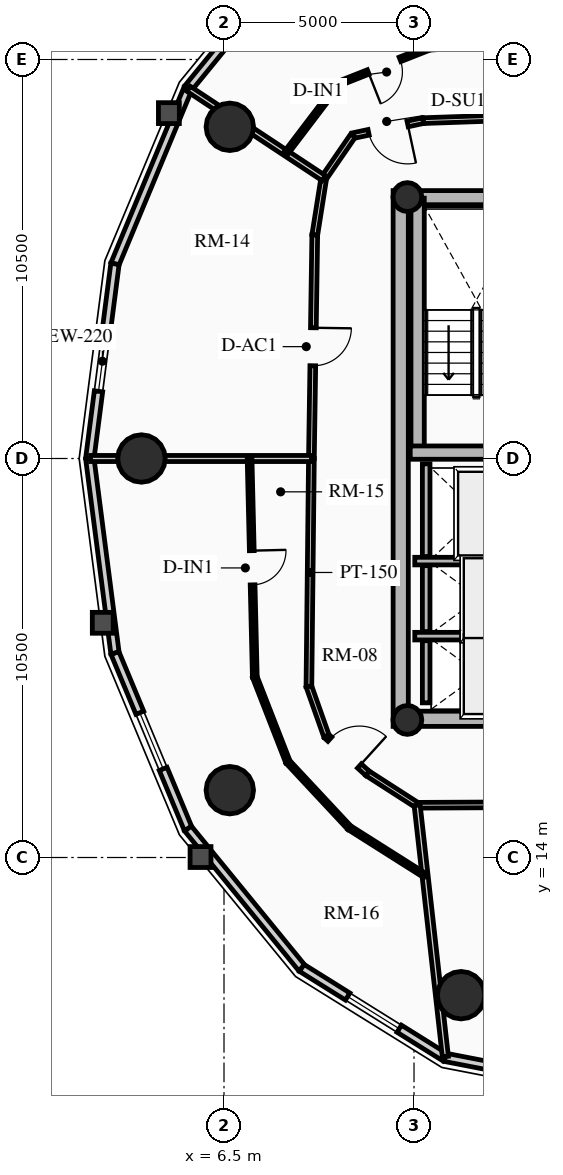
"""IFC4 building model, lengths in metres.
Left out: names, types, materials, properties, quantities, classifications, styles, units other than length and angle.
Written with IfcOpenShell. Run it as: python <this file> out.ifc"""

import sys

from ifc_helpers import new_model, si_unit, direction, frame, frame_2d, origin, origin_2d, place, context, subcontext, project, spatial, rectangle, circle, hollow_circle, extrude, source, transform, mapped, element, fill, save


model = new_model("IFC4")
c1 = context("Model", 3, precision=1e-05, world=origin(), true_north=direction((0.0, 1.0)))
c2 = subcontext(c1, "Body", "Model", "MODEL_VIEW")
j1 = project(units=[si_unit("LENGTHUNIT", "METRE"), si_unit("PLANEANGLEUNIT", "RADIAN")], contexts=[c1])
p1 = place(None, origin())
s1 = spatial("IfcSite", under=j1, at=p1, CompositionType="ELEMENT")
p2 = place(p1, origin())
s2 = spatial("IfcBuilding", under=s1, at=p2, CompositionType="ELEMENT")
p3 = place(p2, frame((0.0, 0.0, 174.88)))
s3 = spatial("IfcBuildingStorey", under=s2, at=p3, CompositionType="ELEMENT", Elevation=174.88)
p4 = place(p3, frame((11.15, 17.45, 0.0), z_axis=(0.0, 0.0, 1.0), x_axis=(0.0, 1.0, 0.0)))
e1 = element("IfcWall", 1, at=p4, inside=s3, PredefinedType="SHEAR", context=c2, shape_type="SweptSolid", body=[
    extrude(rectangle(XDim=14.1, YDim=0.4, at=frame_2d((7.05, 0.0))), origin(), (0.0, 0.0, 1.0), 2.91),
])
p5 = place(p3, frame((11.15, 17.65, 0.0), z_axis=(0.0, 0.0, 1.0), x_axis=(1.0, 0.0, 0.0)))
e2 = element("IfcWall", 2, at=p5, inside=s3, PredefinedType="SHEAR", context=c2, shape_type="SweptSolid", body=[
    extrude(rectangle(XDim=10.7, YDim=0.4, at=frame_2d((5.35, 0.0))), origin(), (0.0, 0.0, 1.0), 2.91),
])
m1 = source(origin(), c2, "Body", "SweptSolid", [
    extrude(rectangle(XDim=1.5, YDim=2.02, at=frame_2d((0.75, 1.01))), frame((0.0, 0.21, 0.0), z_axis=(0.0, -1.0, 0.0), x_axis=(1.0, 0.0, 0.0)), (0.0, 0.0, 1.0), 0.42),
])
p6 = place(p5, frame((5.45, 0.0, 0.0)))
e3 = element("IfcOpeningElement", 3, at=p6, cuts=e2, PredefinedType="OPENING", context=c2, shape_type="MappedRepresentation", body=[
    mapped(m1, transform((0.0, 0.0, 0.0), x_axis=(1.0, 0.0, 0.0), y_axis=(0.0, 1.0, 0.0), z_axis=(0.0, 0.0, 1.0), scale=1.0)),
])
p7 = place(p3, frame((11.15, 31.35, 0.0), z_axis=(0.0, 0.0, 1.0), x_axis=(1.0, 0.0, 0.0)))
e4 = element("IfcWall", 4, at=p7, inside=s3, PredefinedType="SHEAR", context=c2, shape_type="SweptSolid", body=[
    extrude(rectangle(XDim=10.7, YDim=0.4, at=frame_2d((5.35, 0.0))), origin(), (0.0, 0.0, 1.0), 2.91),
])
p8 = place(p7, frame((4.6, 0.0, 0.0)))
e5 = element("IfcOpeningElement", 5, at=p8, cuts=e4, PredefinedType="OPENING", context=c2, shape_type="MappedRepresentation", body=[
    mapped(m1, transform((0.0, 0.0, 0.0), x_axis=(1.0, 0.0, 0.0), y_axis=(0.0, 1.0, 0.0), z_axis=(0.0, 0.0, 1.0), scale=1.0)),
])
p9 = place(p3, frame((11.595, 24.655, 0.0), z_axis=(0.0, 0.0, 1.0), x_axis=(0.0, 1.0, 0.0)))
e6 = element("IfcWall", 6, at=p9, inside=s3, PredefinedType="SHEAR", context=c2, shape_type="SweptSolid", body=[
    extrude(rectangle(XDim=6.695, YDim=0.35, at=frame_2d((3.348, 0.0))), origin(), (0.0, 0.0, 1.0), 2.91),
])
p10 = place(p3, frame((11.4, 24.655, 0.0), z_axis=(0.0, 0.0, 1.0), x_axis=(1.0, 0.0, 0.0)))
e7 = element("IfcWall", 7, at=p10, inside=s3, PredefinedType="SHEAR", context=c2, shape_type="SweptSolid", body=[
    extrude(rectangle(XDim=3.285, YDim=0.35, at=frame_2d((1.643, 0.0))), origin(), (0.0, 0.0, 1.0), 2.91),
])
for number, where, z_axis, x_axis in (
    (8, (11.325, 17.62, 0.0), (0.0, 0.0, 1.0), (1.0, 0.0, 0.0)),
    (9, (11.325, 31.38, 0.0), (0.0, 0.0, 1.0), (1.0, 0.0, 0.0)),
):
    element("IfcColumn", number, at=place(p3, frame(where, z_axis=z_axis, x_axis=x_axis)), inside=s3, PredefinedType="COLUMN", context=c2, shape_type="SweptSolid", body=[
        extrude(hollow_circle(Radius=0.38, WallThickness=0.032, at=origin_2d()), origin(), (0.0, 0.0, 1.0), 2.91),
    ])
for number, where, z_axis, x_axis in (
    (10, (6.653, 33.229, 0.0), (0.0, 0.0, 1.0), (1.0, 0.0, 0.0)),
    (11, (4.328, 24.5, 0.0), (0.0, 0.0, 1.0), (1.0, 0.0, 0.0)),
    (12, (6.653, 15.771, 0.0), (0.0, 0.0, 1.0), (1.0, 0.0, 0.0)),
    (13, (12.739, 10.377, 0.0), (0.0, 0.0, 1.0), (1.0, 0.0, 0.0)),
):
    element("IfcColumn", number, at=place(p3, frame(where, z_axis=z_axis, x_axis=x_axis)), inside=s3, PredefinedType="USERDEFINED", context=c2, shape_type="SweptSolid", body=[
        extrude(circle(Radius=0.625, at=origin_2d()), origin(), (0.0, 0.0, 1.0), 2.91),
    ])
p11 = place(p3, frame((5.553, 34.24, 0.0), z_axis=(0.0, 0.0, 1.0), x_axis=(0.632470615287, 0.774584353572, 0.0)))
e14 = element("IfcWall", 14, at=p11, inside=s3, PredefinedType="SOLIDWALL", context=c2, shape_type="SweptSolid", body=[
    extrude(rectangle(XDim=4.733, YDim=0.22, at=frame_2d((2.366, 0.0))), origin(), (0.0, 0.0, 1.0), 2.245),
])
m2 = source(origin(), c2, "Body", "SweptSolid", [
    extrude(rectangle(XDim=1.6, YDim=1.3, at=frame_2d((0.8, 0.65))), frame((0.0, 0.12, 0.0), z_axis=(0.0, -1.0, 0.0), x_axis=(1.0, 0.0, 0.0)), (0.0, 0.0, 1.0), 0.24),
])
p12 = place(p11, frame((1.566, 0.0, 0.65)))
e15 = element("IfcOpeningElement", 15, at=p12, cuts=e14, PredefinedType="OPENING", context=c2, shape_type="MappedRepresentation", body=[
    mapped(m2, transform((0.0, 0.0, 0.0), x_axis=(1.0, 0.0, 0.0), y_axis=(0.0, 1.0, 0.0), z_axis=(0.0, 0.0, 1.0), scale=1.0)),
])
p13 = place(p3, frame((3.631, 29.62, 0.0), z_axis=(0.0, 0.0, 1.0), x_axis=(0.384144094086, 0.923273152961, 0.0)))
e16 = element("IfcWall", 16, at=p13, inside=s3, PredefinedType="SOLIDWALL", context=c2, shape_type="SweptSolid", body=[
    extrude(rectangle(XDim=5.003, YDim=0.22, at=frame_2d((2.501, 0.0))), origin(), (0.0, 0.0, 1.0), 2.245),
])
p14 = place(p3, frame((2.969, 24.5, 0.0), z_axis=(0.0, 0.0, 1.0), x_axis=(0.128287912609, 0.991736966881, 0.0)))
e17 = element("IfcWall", 17, at=p14, inside=s3, PredefinedType="SOLIDWALL", context=c2, shape_type="SweptSolid", body=[
    extrude(rectangle(XDim=5.163, YDim=0.22, at=frame_2d((2.582, 0.0))), origin(), (0.0, 0.0, 1.0), 2.245),
])
p15 = place(p14, frame((1.782, 0.0, 0.65)))
e18 = element("IfcOpeningElement", 18, at=p15, cuts=e17, PredefinedType="OPENING", context=c2, shape_type="MappedRepresentation", body=[
    mapped(m2, transform((0.0, 0.0, 0.0), x_axis=(1.0, 0.0, 0.0), y_axis=(0.0, 1.0, 0.0), z_axis=(0.0, 0.0, 1.0), scale=1.0)),
])
p16 = place(p3, frame((3.631, 19.38, 0.0), z_axis=(0.0, 0.0, 1.0), x_axis=(-0.128287912609, 0.991736966881, 0.0)))
e19 = element("IfcWall", 19, at=p16, inside=s3, PredefinedType="SOLIDWALL", context=c2, shape_type="SweptSolid", body=[
    extrude(rectangle(XDim=5.163, YDim=0.22, at=frame_2d((2.582, 0.0))), origin(), (0.0, 0.0, 1.0), 2.245),
])
p17 = place(p3, frame((5.553, 14.76, 0.0), z_axis=(0.0, 0.0, 1.0), x_axis=(-0.384144094086, 0.923273152961, 0.0)))
e20 = element("IfcWall", 20, at=p17, inside=s3, PredefinedType="SOLIDWALL", context=c2, shape_type="SweptSolid", body=[
    extrude(rectangle(XDim=5.003, YDim=0.22, at=frame_2d((2.501, 0.0))), origin(), (0.0, 0.0, 1.0), 2.245),
])
p18 = place(p17, frame((1.702, 0.0, 0.65)))
e21 = element("IfcOpeningElement", 21, at=p18, cuts=e20, PredefinedType="OPENING", context=c2, shape_type="MappedRepresentation", body=[
    mapped(m2, transform((0.0, 0.0, 0.0), x_axis=(1.0, 0.0, 0.0), y_axis=(0.0, 1.0, 0.0), z_axis=(0.0, 0.0, 1.0), scale=1.0)),
])
p19 = place(p3, frame((8.547, 11.094, 0.0), z_axis=(0.0, 0.0, 1.0), x_axis=(-0.632470615287, 0.774584353572, 0.0)))
e22 = element("IfcWall", 22, at=p19, inside=s3, PredefinedType="SOLIDWALL", context=c2, shape_type="SweptSolid", body=[
    extrude(rectangle(XDim=4.733, YDim=0.22, at=frame_2d((2.366, 0.0))), origin(), (0.0, 0.0, 1.0), 2.245),
])
p20 = place(p3, frame((12.319, 8.741, 0.0), z_axis=(0.0, 0.0, 1.0), x_axis=(-0.848399108042, 0.529357113368, 0.0)))
e23 = element("IfcWall", 23, at=p20, inside=s3, PredefinedType="SOLIDWALL", context=c2, shape_type="SweptSolid", body=[
    extrude(rectangle(XDim=4.446, YDim=0.22, at=frame_2d((2.223, 0.0))), origin(), (0.0, 0.0, 1.0), 2.245),
])
p21 = place(p20, frame((1.423, 0.0, 0.65)))
e24 = element("IfcOpeningElement", 24, at=p21, cuts=e23, PredefinedType="OPENING", context=c2, shape_type="MappedRepresentation", body=[
    mapped(m2, transform((0.0, 0.0, 0.0), x_axis=(1.0, 0.0, 0.0), y_axis=(0.0, 1.0, 0.0), z_axis=(0.0, 0.0, 1.0), scale=1.0)),
])
p22 = place(p3, frame((16.5, 7.93, 0.0), z_axis=(0.0, 0.0, 1.0), x_axis=(-0.981703883443, 0.190413983815, 0.0)))
e25 = element("IfcWall", 25, at=p22, inside=s3, PredefinedType="SOLIDWALL", context=c2, shape_type="SweptSolid", body=[
    extrude(rectangle(XDim=4.259, YDim=0.22, at=frame_2d((2.13, 0.0))), origin(), (0.0, 0.0, 1.0), 2.245),
])
p23 = place(p22, frame((1.33, 0.0, 0.65)))
e26 = element("IfcOpeningElement", 26, at=p23, cuts=e25, PredefinedType="OPENING", context=c2, shape_type="MappedRepresentation", body=[
    mapped(m2, transform((0.0, 0.0, 0.0), x_axis=(1.0, 0.0, 0.0), y_axis=(0.0, 1.0, 0.0), z_axis=(0.0, 0.0, 1.0), scale=1.0)),
])
p24 = place(p3, frame((11.52, 21.8, 0.0), z_axis=(0.0, 0.0, 1.0), x_axis=(1.0, 0.0, 0.0)))
e27 = element("IfcWall", 27, at=p24, inside=s3, PredefinedType="SHEAR", context=c2, shape_type="SweptSolid", body=[
    extrude(rectangle(XDim=2.97, YDim=0.2, at=frame_2d((1.485, 0.0))), origin(), (0.0, 0.0, 1.0), 2.91),
])
p25 = place(p3, frame((11.82, 21.92, 0.0), z_axis=(0.0, 0.0, 1.0), x_axis=(0.0, 1.0, 0.0)))
e28 = element("IfcWall", 28, at=p25, inside=s3, PredefinedType="SHEAR", context=c2, shape_type="SweptSolid", body=[
    extrude(rectangle(XDim=2.44, YDim=0.2, at=frame_2d((1.22, 0.0))), origin(), (0.0, 0.0, 1.0), 2.91),
])
p26 = place(p3, frame((11.52, 19.825, 0.0), z_axis=(0.0, 0.0, 1.0), x_axis=(1.0, 0.0, 0.0)))
e29 = element("IfcWall", 29, at=p26, inside=s3, PredefinedType="SHEAR", context=c2, shape_type="SweptSolid", body=[
    extrude(rectangle(XDim=2.97, YDim=0.2, at=frame_2d((1.485, 0.0))), origin(), (0.0, 0.0, 1.0), 2.91),
])
p27 = place(p3, frame((11.82, 19.945, 0.0), z_axis=(0.0, 0.0, 1.0), x_axis=(0.0, 1.0, 0.0)))
e30 = element("IfcWall", 30, at=p27, inside=s3, PredefinedType="SHEAR", context=c2, shape_type="SweptSolid", body=[
    extrude(rectangle(XDim=1.735, YDim=0.2, at=frame_2d((0.867, 0.0))), origin(), (0.0, 0.0, 1.0), 2.91),
])
p28 = place(p3, frame((11.82, 18.07, 0.0), z_axis=(0.0, 0.0, 1.0), x_axis=(0.0, 1.0, 0.0)))
e31 = element("IfcWall", 31, at=p28, inside=s3, PredefinedType="SHEAR", context=c2, shape_type="SweptSolid", body=[
    extrude(rectangle(XDim=1.635, YDim=0.2, at=frame_2d((0.817, 0.0))), origin(), (0.0, 0.0, 1.0), 2.91),
])
p29 = place(p3, frame((18.102, 33.61, 0.0), z_axis=(0.0, 0.0, 1.0), x_axis=(-0.999410320072, -0.034336746121, 0.0)))
e32 = element("IfcWall", 32, at=p29, inside=s3, PredefinedType="PARTITIONING", context=c2, shape_type="SweptSolid", body=[
    extrude(rectangle(XDim=6.364, YDim=0.15, at=frame_2d((3.182, 0.0))), origin(), (0.0, 0.0, 1.0), 2.245),
])
p30 = place(p3, frame((11.742, 33.391, 0.0), z_axis=(0.0, 0.0, 1.0), x_axis=(-0.977853431612, -0.209290865268, 0.0)))
e33 = element("IfcWall", 33, at=p30, inside=s3, PredefinedType="PARTITIONING", context=c2, shape_type="SweptSolid", body=[
    extrude(rectangle(XDim=1.89, YDim=0.15, at=frame_2d((0.945, 0.0))), origin(), (0.0, 0.0, 1.0), 2.245),
])
m3 = source(origin(), c2, "Body", "SweptSolid", [
    extrude(rectangle(XDim=1.05, YDim=2.015, at=frame_2d((0.525, 1.007))), frame((0.0, 0.085, 0.0), z_axis=(0.0, -1.0, 0.0), x_axis=(1.0, 0.0, 0.0)), (0.0, 0.0, 1.0), 0.17),
])
p31 = place(p30, frame((0.42, 0.0, 0.0)))
e34 = element("IfcOpeningElement", 34, at=p31, cuts=e33, PredefinedType="OPENING", context=c2, shape_type="MappedRepresentation", body=[
    mapped(m3, transform((0.0, 0.0, 0.0), x_axis=(1.0, 0.0, 0.0), y_axis=(0.0, 1.0, 0.0), z_axis=(0.0, 0.0, 1.0), scale=1.0)),
])
p32 = place(p3, frame((9.894, 32.996, 0.0), z_axis=(0.0, 0.0, 1.0), x_axis=(-0.566521185207, -0.824047175052, 0.0)))
e35 = element("IfcWall", 35, at=p32, inside=s3, PredefinedType="PARTITIONING", context=c2, shape_type="SweptSolid", body=[
    extrude(rectangle(XDim=1.357, YDim=0.15, at=frame_2d((0.678, 0.0))), origin(), (0.0, 0.0, 1.0), 2.245),
])
p33 = place(p3, frame((9.126, 31.878, 0.0), z_axis=(0.0, 0.0, 1.0), x_axis=(-0.156632813117, -0.98765690493, 0.0)))
e36 = element("IfcWall", 36, at=p33, inside=s3, PredefinedType="PARTITIONING", context=c2, shape_type="SweptSolid", body=[
    extrude(rectangle(XDim=1.515, YDim=0.15, at=frame_2d((0.758, 0.0))), origin(), (0.0, 0.0, 1.0), 2.245),
])
p34 = place(p3, frame((8.888, 30.381, 0.0), z_axis=(0.0, 0.0, 1.0), x_axis=(-0.015025285815, -0.999887114021, 0.0)))
e37 = element("IfcWall", 37, at=p34, inside=s3, PredefinedType="PARTITIONING", context=c2, shape_type="SweptSolid", body=[
    extrude(rectangle(XDim=5.882, YDim=0.15, at=frame_2d((2.941, 0.0))), origin(), (0.0, 0.0, 1.0), 2.675),
])
m4 = source(origin(), c2, "Body", "SweptSolid", [
    extrude(rectangle(XDim=1.0, YDim=2.015, at=frame_2d((0.5, 1.007))), frame((0.0, 0.085, 0.0), z_axis=(0.0, -1.0, 0.0), x_axis=(1.0, 0.0, 0.0)), (0.0, 0.0, 1.0), 0.17),
])
p35 = place(p34, frame((2.441, 0.0, 0.0)))
e38 = element("IfcOpeningElement", 38, at=p35, cuts=e37, PredefinedType="OPENING", context=c2, shape_type="MappedRepresentation", body=[
    mapped(m4, transform((0.0, 0.0, 0.0), x_axis=(1.0, 0.0, 0.0), y_axis=(0.0, 1.0, 0.0), z_axis=(0.0, 0.0, 1.0), scale=1.0)),
])
p36 = place(p3, frame((8.8, 24.5, 0.0), z_axis=(0.0, 0.0, 1.0), x_axis=(-0.011028591374, -0.999939183237, 0.0)))
e39 = element("IfcWall", 39, at=p36, inside=s3, PredefinedType="PARTITIONING", context=c2, shape_type="SweptSolid", body=[
    extrude(rectangle(XDim=5.999, YDim=0.15, at=frame_2d((3.0, 0.0))), origin(), (0.0, 0.0, 1.0), 2.245),
])
p37 = place(p3, frame((8.734, 18.501, 0.0), z_axis=(0.0, 0.0, 1.0), x_axis=(0.333612366873, -0.94271034187, 0.0)))
e40 = element("IfcWall", 40, at=p37, inside=s3, PredefinedType="PARTITIONING", context=c2, shape_type="SweptSolid", body=[
    extrude(rectangle(XDim=1.386, YDim=0.15, at=frame_2d((0.693, 0.0))), origin(), (0.0, 0.0, 1.0), 2.245),
])
p38 = place(p3, frame((9.196, 17.195, 0.0), z_axis=(0.0, 0.0, 1.0), x_axis=(0.740734525483, -0.671797858553, 0.0)))
e41 = element("IfcWall", 41, at=p38, inside=s3, PredefinedType="PARTITIONING", context=c2, shape_type="SweptSolid", body=[
    extrude(rectangle(XDim=1.459, YDim=0.15, at=frame_2d((0.729, 0.0))), origin(), (0.0, 0.0, 1.0), 2.245),
])
p39 = place(p38, frame((0.12, 0.0, 0.0)))
e42 = element("IfcOpeningElement", 42, at=p39, cuts=e41, PredefinedType="OPENING", context=c2, shape_type="MappedRepresentation", body=[
    mapped(m3, transform((0.0, 0.0, 0.0), x_axis=(1.0, 0.0, 0.0), y_axis=(0.0, 1.0, 0.0), z_axis=(0.0, 0.0, 1.0), scale=1.0)),
])
p40 = place(p3, frame((10.277, 16.214, 0.0), z_axis=(0.0, 0.0, 1.0), x_axis=(0.841060909507, -0.540940427865, 0.0)))
e43 = element("IfcWall", 43, at=p40, inside=s3, PredefinedType="PARTITIONING", context=c2, shape_type="SweptSolid", body=[
    extrude(rectangle(XDim=1.552, YDim=0.15, at=frame_2d((0.776, 0.0))), origin(), (0.0, 0.0, 1.0), 2.245),
])
p41 = place(p3, frame((11.583, 15.375, 0.0), z_axis=(0.0, 0.0, 1.0), x_axis=(0.999988014548, 0.004895994347, 0.0)))
e44 = element("IfcWall", 44, at=p41, inside=s3, PredefinedType="PARTITIONING", context=c2, shape_type="SweptSolid", body=[
    extrude(rectangle(XDim=3.241, YDim=0.15, at=frame_2d((1.621, 0.0))), origin(), (0.0, 0.0, 1.0), 2.245),
])
p42 = place(p3, frame((9.126, 31.878, 0.0), z_axis=(0.0, 0.0, 1.0), x_axis=(-0.834299098788, 0.551312083815, 0.0)))
e45 = element("IfcWall", 45, at=p42, inside=s3, PredefinedType="PARTITIONING", context=c2, shape_type="SweptSolid", body=[
    extrude(rectangle(XDim=4.263, YDim=0.16, at=frame_2d((2.131, 0.0))), origin(), (0.0, 0.0, 1.0), 2.245),
])
p43 = place(p3, frame((8.8, 24.5, 0.0), z_axis=(0.0, 0.0, 1.0), x_axis=(-1.0, 0.0, 0.0)))
e46 = element("IfcWall", 46, at=p43, inside=s3, PredefinedType="PARTITIONING", context=c2, shape_type="SweptSolid", body=[
    extrude(rectangle(XDim=5.811, YDim=0.16, at=frame_2d((2.906, 0.0))), origin(), (0.0, 0.0, 1.0), 2.245),
])
p44 = place(p3, frame((11.583, 15.375, 0.0), z_axis=(0.0, 0.0, 1.0), x_axis=(0.111538514066, -0.993760111838, 0.0)))
e47 = element("IfcWall", 47, at=p44, inside=s3, PredefinedType="PARTITIONING", context=c2, shape_type="SweptSolid", body=[
    extrude(rectangle(XDim=6.656, YDim=0.16, at=frame_2d((3.328, 0.0))), origin(), (0.0, 0.0, 1.0), 2.245),
])
p45 = place(p3, frame((11.906, 35.309, 0.0), z_axis=(0.0, 0.0, 1.0), x_axis=(-0.930011423211, -0.367530614639, 0.0)))
e48 = element("IfcWall", 48, at=p45, inside=s3, PredefinedType="PARTITIONING", context=c2, shape_type="SweptSolid", body=[
    extrude(rectangle(XDim=2.565, YDim=0.125, at=frame_2d((1.282, 0.0))), origin(), (0.0, 0.0, 1.0), 2.245),
])
m5 = source(origin(), c2, "Body", "SweptSolid", [
    extrude(rectangle(XDim=0.9, YDim=2.005, at=frame_2d((0.45, 1.002))), frame((0.0, 0.073, 0.0), z_axis=(0.0, -1.0, 0.0), x_axis=(1.0, 0.0, 0.0)), (0.0, 0.0, 1.0), 0.145),
])
p46 = place(p45, frame((0.832, 0.0, 0.0)))
e49 = element("IfcOpeningElement", 49, at=p46, cuts=e48, PredefinedType="OPENING", context=c2, shape_type="MappedRepresentation", body=[
    mapped(m5, transform((0.0, 0.0, 0.0), x_axis=(1.0, 0.0, 0.0), y_axis=(0.0, 1.0, 0.0), z_axis=(0.0, 0.0, 1.0), scale=1.0)),
])
p47 = place(p3, frame((9.52, 34.366, 0.0), z_axis=(0.0, 0.0, 1.0), x_axis=(-0.604900120492, -0.796301352648, 0.0)))
e50 = element("IfcWall", 50, at=p47, inside=s3, PredefinedType="PARTITIONING", context=c2, shape_type="SweptSolid", body=[
    extrude(rectangle(XDim=2.299, YDim=0.125, at=frame_2d((1.149, 0.0))), origin(), (0.0, 0.0, 1.0), 2.245),
])
p48 = place(p3, frame((7.173, 24.5, 0.0), z_axis=(0.0, 0.0, 1.0), x_axis=(0.023936084601, -0.999713490883, 0.0)))
e51 = element("IfcWall", 51, at=p48, inside=s3, PredefinedType="PARTITIONING", context=c2, shape_type="SweptSolid", body=[
    extrude(rectangle(XDim=5.753, YDim=0.125, at=frame_2d((2.876, 0.0))), origin(), (0.0, 0.0, 1.0), 2.245),
])
p49 = place(p48, frame((2.426, 0.0, 0.0)))
e52 = element("IfcOpeningElement", 52, at=p49, cuts=e51, PredefinedType="OPENING", context=c2, shape_type="MappedRepresentation", body=[
    mapped(m5, transform((0.0, 0.0, 0.0), x_axis=(1.0, 0.0, 0.0), y_axis=(0.0, 1.0, 0.0), z_axis=(0.0, 0.0, 1.0), scale=1.0)),
])
p50 = place(p3, frame((7.311, 18.749, 0.0), z_axis=(0.0, 0.0, 1.0), x_axis=(0.363119757726, -0.931742475982, 0.0)))
e53 = element("IfcWall", 53, at=p50, inside=s3, PredefinedType="PARTITIONING", context=c2, shape_type="SweptSolid", body=[
    extrude(rectangle(XDim=2.396, YDim=0.125, at=frame_2d((1.198, 0.0))), origin(), (0.0, 0.0, 1.0), 2.245),
])
p51 = place(p3, frame((8.181, 16.516, 0.0), z_axis=(0.0, 0.0, 1.0), x_axis=(0.682244764422, -0.731123848209, 0.0)))
e54 = element("IfcWall", 54, at=p51, inside=s3, PredefinedType="PARTITIONING", context=c2, shape_type="SweptSolid", body=[
    extrude(rectangle(XDim=2.367, YDim=0.125, at=frame_2d((1.184, 0.0))), origin(), (0.0, 0.0, 1.0), 2.245),
])
p52 = place(p3, frame((9.796, 14.785, 0.0), z_axis=(0.0, 0.0, 1.0), x_axis=(0.844898543763, -0.534926584446, 0.0)))
e55 = element("IfcWall", 55, at=p52, inside=s3, PredefinedType="PARTITIONING", context=c2, shape_type="SweptSolid", body=[
    extrude(rectangle(XDim=2.361, YDim=0.125, at=frame_2d((1.18, 0.0))), origin(), (0.0, 0.0, 1.0), 2.245),
])
m6 = source(origin(), c2, "Body", "SweptSolid", [
    extrude(rectangle(XDim=1.6, YDim=1.3, at=frame_2d((0.8, 0.65))), frame((0.0, 0.03, 0.0), z_axis=(0.0, -1.0, 0.0), x_axis=(1.0, 0.0, 0.0)), (0.0, 0.0, 1.0), 0.06),
])
p53 = place(p15, origin())
e56 = element("IfcWindow", 56, at=p53, inside=s3, PartitioningType="SINGLE_PANEL", PredefinedType="WINDOW", context=c2, shape_type="MappedRepresentation", body=[
    mapped(m6, transform((0.0, 0.0, 0.0), x_axis=(1.0, 0.0, 0.0), y_axis=(0.0, 1.0, 0.0), z_axis=(0.0, 0.0, 1.0), scale=1.0)),
])
fill(e18, e56)
p54 = place(p18, origin())
e57 = element("IfcWindow", 57, at=p54, inside=s3, PartitioningType="SINGLE_PANEL", PredefinedType="WINDOW", context=c2, shape_type="MappedRepresentation", body=[
    mapped(m6, transform((0.0, 0.0, 0.0), x_axis=(1.0, 0.0, 0.0), y_axis=(0.0, 1.0, 0.0), z_axis=(0.0, 0.0, 1.0), scale=1.0)),
])
fill(e21, e57)
p55 = place(p21, origin())
e58 = element("IfcWindow", 58, at=p55, inside=s3, PartitioningType="SINGLE_PANEL", PredefinedType="WINDOW", context=c2, shape_type="MappedRepresentation", body=[
    mapped(m6, transform((0.0, 0.0, 0.0), x_axis=(1.0, 0.0, 0.0), y_axis=(0.0, 1.0, 0.0), z_axis=(0.0, 0.0, 1.0), scale=1.0)),
])
fill(e24, e58)
m7 = source(origin(), c2, "Body", "SweptSolid", [
    extrude(rectangle(XDim=1.05, YDim=2.015, at=frame_2d((0.525, 1.007))), frame((0.0, 0.025, 0.0), z_axis=(0.0, -1.0, 0.0), x_axis=(1.0, 0.0, 0.0)), (0.0, 0.0, 1.0), 0.05),
])
p56 = place(p31, origin())
e59 = element("IfcDoor", 59, at=p56, inside=s3, OperationType="SINGLE_SWING_LEFT", PredefinedType="DOOR", context=c2, shape_type="MappedRepresentation", body=[
    mapped(m7, transform((0.0, 0.0, 0.0), x_axis=(1.0, 0.0, 0.0), y_axis=(0.0, 1.0, 0.0), z_axis=(0.0, 0.0, 1.0), scale=1.0)),
])
fill(e34, e59)
m8 = source(origin(), c2, "Body", "SweptSolid", [
    extrude(rectangle(XDim=0.9, YDim=2.005, at=frame_2d((0.45, 1.002))), frame((0.0, 0.025, 0.0), z_axis=(0.0, -1.0, 0.0), x_axis=(1.0, 0.0, 0.0)), (0.0, 0.0, 1.0), 0.05),
])
p57 = place(p46, origin())
e60 = element("IfcDoor", 60, at=p57, inside=s3, OperationType="SINGLE_SWING_RIGHT", PredefinedType="DOOR", context=c2, shape_type="MappedRepresentation", body=[
    mapped(m8, transform((0.0, 0.0, 0.0), x_axis=(1.0, 0.0, 0.0), y_axis=(0.0, 1.0, 0.0), z_axis=(0.0, 0.0, 1.0), scale=1.0)),
])
fill(e49, e60)
m9 = source(origin(), c2, "Body", "SweptSolid", [
    extrude(rectangle(XDim=1.0, YDim=2.015, at=frame_2d((0.5, 1.007))), frame((0.0, 0.025, 0.0), z_axis=(0.0, -1.0, 0.0), x_axis=(1.0, 0.0, 0.0)), (0.0, 0.0, 1.0), 0.05),
])
p58 = place(p35, origin())
e61 = element("IfcDoor", 61, at=p58, inside=s3, OperationType="SINGLE_SWING_LEFT", PredefinedType="DOOR", context=c2, shape_type="MappedRepresentation", body=[
    mapped(m9, transform((0.0, 0.0, 0.0), x_axis=(1.0, 0.0, 0.0), y_axis=(0.0, 1.0, 0.0), z_axis=(0.0, 0.0, 1.0), scale=1.0)),
])
fill(e38, e61)
p59 = place(p39, origin())
e62 = element("IfcDoor", 62, at=p59, inside=s3, OperationType="SINGLE_SWING_RIGHT", PredefinedType="DOOR", context=c2, shape_type="MappedRepresentation", body=[
    mapped(m7, transform((0.0, 0.0, 0.0), x_axis=(1.0, 0.0, 0.0), y_axis=(0.0, 1.0, 0.0), z_axis=(0.0, 0.0, 1.0), scale=1.0)),
])
fill(e42, e62)
p60 = place(p49, origin())
e63 = element("IfcDoor", 63, at=p60, inside=s3, OperationType="SINGLE_SWING_LEFT", PredefinedType="DOOR", context=c2, shape_type="MappedRepresentation", body=[
    mapped(m8, transform((0.0, 0.0, 0.0), x_axis=(1.0, 0.0, 0.0), y_axis=(0.0, 1.0, 0.0), z_axis=(0.0, 0.0, 1.0), scale=1.0)),
])
fill(e52, e63)
save(model, sys.argv[1])
